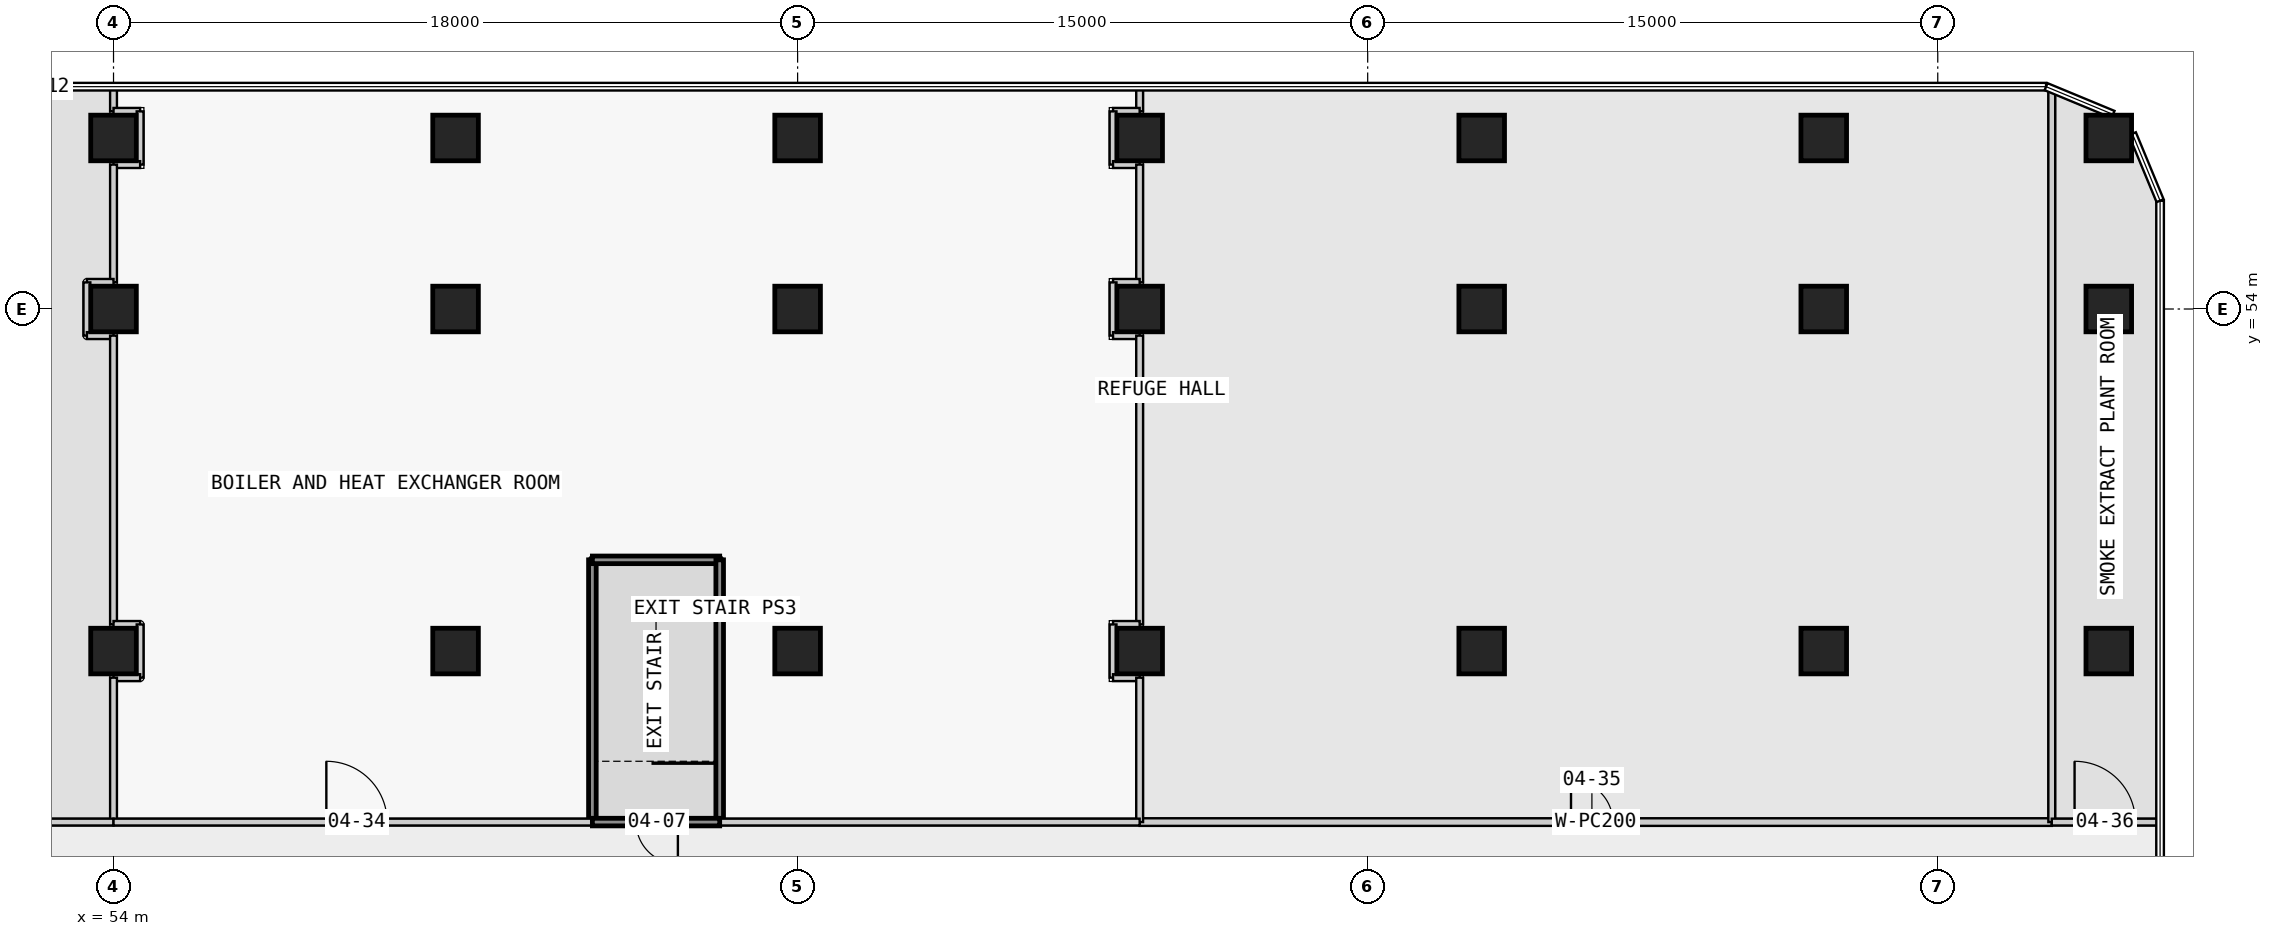
"""IFC4 building model, lengths in metres.
Left out: names, types, materials, properties, quantities, classifications, styles, units other than length and angle.
Written with IfcOpenShell. Run it as: python <this file> out.ifc"""

import sys

from ifc_helpers import new_model, si_unit, direction, frame, frame_2d, origin, origin_2d, place, context, subcontext, project, spatial, rectangle, extrude, element, fill, save


model = new_model("IFC4")
c1 = context("Model", 3, precision=1e-05, world=origin(), true_north=direction((0.0, 1.0)))
c2 = subcontext(c1, "Body", "Model", "MODEL_VIEW")
j1 = project(units=[si_unit("LENGTHUNIT", "METRE"), si_unit("PLANEANGLEUNIT", "RADIAN")], contexts=[c1])
p1 = place(None, origin())
s1 = spatial("IfcSite", under=j1, at=p1, CompositionType="ELEMENT")
p2 = place(p1, origin())
s2 = spatial("IfcBuilding", under=s1, at=p2, CompositionType="ELEMENT")
p3 = place(p2, frame((0.0, 0.0, 21.8)))
s3 = spatial("IfcBuildingStorey", under=s2, at=p3, CompositionType="ELEMENT", Elevation=21.8)
for number, where, z_axis, x_axis in (
    (1, (54.0, 45.0, 0.0), (0.0, 0.0, 1.0), (1.0, 0.0, 0.0)),
    (2, (54.0, 54.0, 0.0), (0.0, 0.0, 1.0), (1.0, 0.0, 0.0)),
    (3, (54.0, 58.5, 0.0), (0.0, 0.0, 1.0), (1.0, 0.0, 0.0)),
    (4, (63.0, 45.0, 0.0), (0.0, 0.0, 1.0), (1.0, 0.0, 0.0)),
    (5, (63.0, 54.0, 0.0), (0.0, 0.0, 1.0), (1.0, 0.0, 0.0)),
    (6, (63.0, 58.5, 0.0), (0.0, 0.0, 1.0), (1.0, 0.0, 0.0)),
    (7, (72.0, 45.0, 0.0), (0.0, 0.0, 1.0), (1.0, 0.0, 0.0)),
    (8, (72.0, 54.0, 0.0), (0.0, 0.0, 1.0), (1.0, 0.0, 0.0)),
    (9, (72.0, 58.5, 0.0), (0.0, 0.0, 1.0), (1.0, 0.0, 0.0)),
    (10, (81.0, 45.0, 0.0), (0.0, 0.0, 1.0), (1.0, 0.0, 0.0)),
    (11, (81.0, 54.0, 0.0), (0.0, 0.0, 1.0), (1.0, 0.0, 0.0)),
    (12, (81.0, 58.5, 0.0), (0.0, 0.0, 1.0), (1.0, 0.0, 0.0)),
    (13, (90.0, 45.0, 0.0), (0.0, 0.0, 1.0), (1.0, 0.0, 0.0)),
    (14, (90.0, 54.0, 0.0), (0.0, 0.0, 1.0), (1.0, 0.0, 0.0)),
    (15, (90.0, 58.5, 0.0), (0.0, 0.0, 1.0), (1.0, 0.0, 0.0)),
    (16, (99.0, 45.0, 0.0), (0.0, 0.0, 1.0), (1.0, 0.0, 0.0)),
    (17, (99.0, 54.0, 0.0), (0.0, 0.0, 1.0), (1.0, 0.0, 0.0)),
    (18, (99.0, 58.5, 0.0), (0.0, 0.0, 1.0), (1.0, 0.0, 0.0)),
    (19, (106.5, 45.0, 0.0), (0.0, 0.0, 1.0), (1.0, 0.0, 0.0)),
    (20, (106.5, 54.0, 0.0), (0.0, 0.0, 1.0), (1.0, 0.0, 0.0)),
    (21, (106.5, 58.5, 0.0), (0.0, 0.0, 1.0), (1.0, 0.0, 0.0)),
):
    element("IfcColumn", number, at=place(p3, frame(where, z_axis=z_axis, x_axis=x_axis)), inside=s3, PredefinedType="COLUMN", context=c2, shape_type="SweptSolid", body=[
        extrude(rectangle(XDim=1.2, YDim=1.2, at=origin_2d()), origin(), (0.0, 0.0, 1.0), 5.0),
    ])
p4 = place(p3, frame((81.0, 40.5, 0.0), z_axis=(0.0, 0.0, 1.0), x_axis=(1.0, 0.0, 0.0)))
e22 = element("IfcWall", 22, at=p4, inside=s3, PredefinedType="PARTITIONING", context=c2, shape_type="SweptSolid", body=[
    extrude(rectangle(XDim=24.0, YDim=0.2, at=frame_2d((12.0, 0.0))), origin(), (0.0, 0.0, 1.0), 4.5),
])
p5 = place(p4, frame((11.35, 0.0, 0.0)))
e23 = element("IfcOpeningElement", 23, at=p5, cuts=e22, PredefinedType="OPENING", context=c2, shape_type="SweptSolid", body=[
    extrude(rectangle(XDim=1.1, YDim=2.1, at=frame_2d((0.55, 1.05))), frame((0.0, 0.11, 0.0), z_axis=(0.0, -1.0, 0.0), x_axis=(1.0, 0.0, 0.0)), (0.0, 0.0, 1.0), 0.22),
])
p6 = place(p3, frame((81.0, 59.85, 0.0), z_axis=(0.0, 0.0, 1.0), x_axis=(0.0, -1.0, 0.0)))
e24 = element("IfcWall", 24, at=p6, inside=s3, PredefinedType="PARTITIONING", context=c2, shape_type="SweptSolid", body=[
    extrude(rectangle(XDim=0.65, YDim=0.18, at=frame_2d((0.325, 0.0))), origin(), (0.0, 0.0, 1.0), 4.5),
])
p7 = place(p3, frame((81.0, 59.2, 0.0), z_axis=(0.0, 0.0, 1.0), x_axis=(-1.0, 0.0, 0.0)))
e25 = element("IfcWall", 25, at=p7, inside=s3, PredefinedType="PARTITIONING", context=c2, shape_type="SweptSolid", body=[
    extrude(rectangle(XDim=0.7, YDim=0.18, at=frame_2d((0.35, 0.0))), origin(), (0.0, 0.0, 1.0), 4.5),
])
p8 = place(p3, frame((80.3, 59.2, 0.0), z_axis=(0.0, 0.0, 1.0), x_axis=(0.0, -1.0, 0.0)))
e26 = element("IfcWall", 26, at=p8, inside=s3, PredefinedType="PARTITIONING", context=c2, shape_type="SweptSolid", body=[
    extrude(rectangle(XDim=1.4, YDim=0.18, at=frame_2d((0.7, 0.0))), origin(), (0.0, 0.0, 1.0), 4.5),
])
p9 = place(p3, frame((80.3, 57.8, 0.0), z_axis=(0.0, 0.0, 1.0), x_axis=(1.0, 0.0, 0.0)))
e27 = element("IfcWall", 27, at=p9, inside=s3, PredefinedType="PARTITIONING", context=c2, shape_type="SweptSolid", body=[
    extrude(rectangle(XDim=0.7, YDim=0.18, at=frame_2d((0.35, 0.0))), origin(), (0.0, 0.0, 1.0), 4.5),
])
p10 = place(p3, frame((81.0, 57.8, 0.0), z_axis=(0.0, 0.0, 1.0), x_axis=(0.0, -1.0, 0.0)))
e28 = element("IfcWall", 28, at=p10, inside=s3, PredefinedType="PARTITIONING", context=c2, shape_type="SweptSolid", body=[
    extrude(rectangle(XDim=3.1, YDim=0.18, at=frame_2d((1.55, 0.0))), origin(), (0.0, 0.0, 1.0), 4.5),
])
p11 = place(p3, frame((81.0, 54.7, 0.0), z_axis=(0.0, 0.0, 1.0), x_axis=(-1.0, 0.0, 0.0)))
e29 = element("IfcWall", 29, at=p11, inside=s3, PredefinedType="PARTITIONING", context=c2, shape_type="SweptSolid", body=[
    extrude(rectangle(XDim=0.7, YDim=0.18, at=frame_2d((0.35, 0.0))), origin(), (0.0, 0.0, 1.0), 4.5),
])
p12 = place(p3, frame((80.3, 54.7, 0.0), z_axis=(0.0, 0.0, 1.0), x_axis=(0.0, -1.0, 0.0)))
e30 = element("IfcWall", 30, at=p12, inside=s3, PredefinedType="PARTITIONING", context=c2, shape_type="SweptSolid", body=[
    extrude(rectangle(XDim=1.4, YDim=0.18, at=frame_2d((0.7, 0.0))), origin(), (0.0, 0.0, 1.0), 4.5),
])
p13 = place(p3, frame((80.3, 53.3, 0.0), z_axis=(0.0, 0.0, 1.0), x_axis=(1.0, 0.0, 0.0)))
e31 = element("IfcWall", 31, at=p13, inside=s3, PredefinedType="PARTITIONING", context=c2, shape_type="SweptSolid", body=[
    extrude(rectangle(XDim=0.7, YDim=0.18, at=frame_2d((0.35, 0.0))), origin(), (0.0, 0.0, 1.0), 4.5),
])
p14 = place(p3, frame((81.0, 53.3, 0.0), z_axis=(0.0, 0.0, 1.0), x_axis=(0.0, -1.0, 0.0)))
e32 = element("IfcWall", 32, at=p14, inside=s3, PredefinedType="PARTITIONING", context=c2, shape_type="SweptSolid", body=[
    extrude(rectangle(XDim=7.6, YDim=0.18, at=frame_2d((3.8, 0.0))), origin(), (0.0, 0.0, 1.0), 4.5),
])
p15 = place(p3, frame((81.0, 45.7, 0.0), z_axis=(0.0, 0.0, 1.0), x_axis=(-1.0, 0.0, 0.0)))
e33 = element("IfcWall", 33, at=p15, inside=s3, PredefinedType="PARTITIONING", context=c2, shape_type="SweptSolid", body=[
    extrude(rectangle(XDim=0.7, YDim=0.18, at=frame_2d((0.35, 0.0))), origin(), (0.0, 0.0, 1.0), 4.5),
])
p16 = place(p3, frame((80.3, 45.7, 0.0), z_axis=(0.0, 0.0, 1.0), x_axis=(0.0, -1.0, 0.0)))
e34 = element("IfcWall", 34, at=p16, inside=s3, PredefinedType="PARTITIONING", context=c2, shape_type="SweptSolid", body=[
    extrude(rectangle(XDim=1.4, YDim=0.18, at=frame_2d((0.7, 0.0))), origin(), (0.0, 0.0, 1.0), 4.5),
])
p17 = place(p3, frame((80.3, 44.3, 0.0), z_axis=(0.0, 0.0, 1.0), x_axis=(1.0, 0.0, 0.0)))
e35 = element("IfcWall", 35, at=p17, inside=s3, PredefinedType="PARTITIONING", context=c2, shape_type="SweptSolid", body=[
    extrude(rectangle(XDim=0.7, YDim=0.18, at=frame_2d((0.35, 0.0))), origin(), (0.0, 0.0, 1.0), 4.5),
])
p18 = place(p3, frame((81.0, 44.3, 0.0), z_axis=(0.0, 0.0, 1.0), x_axis=(0.0, -1.0, 0.0)))
e36 = element("IfcWall", 36, at=p18, inside=s3, PredefinedType="PARTITIONING", context=c2, shape_type="SweptSolid", body=[
    extrude(rectangle(XDim=3.8, YDim=0.18, at=frame_2d((1.9, 0.0))), origin(), (0.0, 0.0, 1.0), 4.5),
])
p19 = place(p3, frame((54.0, 59.85, 0.0), z_axis=(0.0, 0.0, 1.0), x_axis=(0.0, -1.0, 0.0)))
e37 = element("IfcWall", 37, at=p19, inside=s3, PredefinedType="PARTITIONING", context=c2, shape_type="SweptSolid", body=[
    extrude(rectangle(XDim=0.65, YDim=0.18, at=frame_2d((0.325, 0.0))), origin(), (0.0, 0.0, 1.0), 4.5),
])
p20 = place(p3, frame((54.0, 59.2, 0.0), z_axis=(0.0, 0.0, 1.0), x_axis=(1.0, 0.0, 0.0)))
e38 = element("IfcWall", 38, at=p20, inside=s3, PredefinedType="PARTITIONING", context=c2, shape_type="SweptSolid", body=[
    extrude(rectangle(XDim=0.7, YDim=0.18, at=frame_2d((0.35, 0.0))), origin(), (0.0, 0.0, 1.0), 4.5),
])
p21 = place(p3, frame((54.7, 59.2, 0.0), z_axis=(0.0, 0.0, 1.0), x_axis=(0.0, -1.0, 0.0)))
e39 = element("IfcWall", 39, at=p21, inside=s3, PredefinedType="PARTITIONING", context=c2, shape_type="SweptSolid", body=[
    extrude(rectangle(XDim=1.4, YDim=0.18, at=frame_2d((0.7, 0.0))), origin(), (0.0, 0.0, 1.0), 4.5),
])
p22 = place(p3, frame((54.7, 57.8, 0.0), z_axis=(0.0, 0.0, 1.0), x_axis=(-1.0, 0.0, 0.0)))
e40 = element("IfcWall", 40, at=p22, inside=s3, PredefinedType="PARTITIONING", context=c2, shape_type="SweptSolid", body=[
    extrude(rectangle(XDim=0.7, YDim=0.18, at=frame_2d((0.35, 0.0))), origin(), (0.0, 0.0, 1.0), 4.5),
])
p23 = place(p3, frame((54.0, 57.8, 0.0), z_axis=(0.0, 0.0, 1.0), x_axis=(0.0, -1.0, 0.0)))
e41 = element("IfcWall", 41, at=p23, inside=s3, PredefinedType="PARTITIONING", context=c2, shape_type="SweptSolid", body=[
    extrude(rectangle(XDim=3.1, YDim=0.18, at=frame_2d((1.55, 0.0))), origin(), (0.0, 0.0, 1.0), 4.5),
])
p24 = place(p3, frame((54.0, 54.7, 0.0), z_axis=(0.0, 0.0, 1.0), x_axis=(-1.0, 0.0, 0.0)))
e42 = element("IfcWall", 42, at=p24, inside=s3, PredefinedType="PARTITIONING", context=c2, shape_type="SweptSolid", body=[
    extrude(rectangle(XDim=0.7, YDim=0.18, at=frame_2d((0.35, 0.0))), origin(), (0.0, 0.0, 1.0), 4.5),
])
p25 = place(p3, frame((53.3, 54.7, 0.0), z_axis=(0.0, 0.0, 1.0), x_axis=(0.0, -1.0, 0.0)))
e43 = element("IfcWall", 43, at=p25, inside=s3, PredefinedType="PARTITIONING", context=c2, shape_type="SweptSolid", body=[
    extrude(rectangle(XDim=1.4, YDim=0.18, at=frame_2d((0.7, 0.0))), origin(), (0.0, 0.0, 1.0), 4.5),
])
p26 = place(p3, frame((53.3, 53.3, 0.0), z_axis=(0.0, 0.0, 1.0), x_axis=(1.0, 0.0, 0.0)))
e44 = element("IfcWall", 44, at=p26, inside=s3, PredefinedType="PARTITIONING", context=c2, shape_type="SweptSolid", body=[
    extrude(rectangle(XDim=0.7, YDim=0.18, at=frame_2d((0.35, 0.0))), origin(), (0.0, 0.0, 1.0), 4.5),
])
p27 = place(p3, frame((54.0, 53.3, 0.0), z_axis=(0.0, 0.0, 1.0), x_axis=(0.0, -1.0, 0.0)))
e45 = element("IfcWall", 45, at=p27, inside=s3, PredefinedType="PARTITIONING", context=c2, shape_type="SweptSolid", body=[
    extrude(rectangle(XDim=7.6, YDim=0.18, at=frame_2d((3.8, 0.0))), origin(), (0.0, 0.0, 1.0), 4.5),
])
p28 = place(p3, frame((54.0, 45.7, 0.0), z_axis=(0.0, 0.0, 1.0), x_axis=(1.0, 0.0, 0.0)))
e46 = element("IfcWall", 46, at=p28, inside=s3, PredefinedType="PARTITIONING", context=c2, shape_type="SweptSolid", body=[
    extrude(rectangle(XDim=0.7, YDim=0.18, at=frame_2d((0.35, 0.0))), origin(), (0.0, 0.0, 1.0), 4.5),
])
p29 = place(p3, frame((54.7, 45.7, 0.0), z_axis=(0.0, 0.0, 1.0), x_axis=(0.0, -1.0, 0.0)))
e47 = element("IfcWall", 47, at=p29, inside=s3, PredefinedType="PARTITIONING", context=c2, shape_type="SweptSolid", body=[
    extrude(rectangle(XDim=1.4, YDim=0.18, at=frame_2d((0.7, 0.0))), origin(), (0.0, 0.0, 1.0), 4.5),
])
p30 = place(p3, frame((54.7, 44.3, 0.0), z_axis=(0.0, 0.0, 1.0), x_axis=(-1.0, 0.0, 0.0)))
e48 = element("IfcWall", 48, at=p30, inside=s3, PredefinedType="PARTITIONING", context=c2, shape_type="SweptSolid", body=[
    extrude(rectangle(XDim=0.7, YDim=0.18, at=frame_2d((0.35, 0.0))), origin(), (0.0, 0.0, 1.0), 4.5),
])
p31 = place(p3, frame((54.0, 44.3, 0.0), z_axis=(0.0, 0.0, 1.0), x_axis=(0.0, -1.0, 0.0)))
e49 = element("IfcWall", 49, at=p31, inside=s3, PredefinedType="PARTITIONING", context=c2, shape_type="SweptSolid", body=[
    extrude(rectangle(XDim=3.8, YDim=0.18, at=frame_2d((1.9, 0.0))), origin(), (0.0, 0.0, 1.0), 4.5),
])
p32 = place(p3, frame((33.95, 40.5, 0.0), z_axis=(0.0, 0.0, 1.0), x_axis=(1.0, 0.0, 0.0)))
e50 = element("IfcWall", 50, at=p32, inside=s3, PredefinedType="PARTITIONING", context=c2, shape_type="SweptSolid", body=[
    extrude(rectangle(XDim=20.05, YDim=0.18, at=frame_2d((10.025, 0.0))), origin(), (0.0, 0.0, 1.0), 4.5),
])
p33 = place(p3, frame((105.0, 59.788, 0.0), z_axis=(0.0, 0.0, 1.0), x_axis=(0.0, -1.0, 0.0)))
e51 = element("IfcWall", 51, at=p33, inside=s3, PredefinedType="PARTITIONING", context=c2, shape_type="SweptSolid", body=[
    extrude(rectangle(XDim=19.288, YDim=0.18, at=frame_2d((9.644, 0.0))), origin(), (0.0, 0.0, 1.0), 4.5),
])
p34 = place(p3, frame((66.6, 40.5, 0.0), z_axis=(0.0, 0.0, 1.0), x_axis=(0.0, 1.0, 0.0)))
e52 = element("IfcWall", 52, at=p34, inside=s3, PredefinedType="PARTITIONING", context=c2, shape_type="SweptSolid", body=[
    extrude(rectangle(XDim=6.9, YDim=0.2, at=frame_2d((3.45, 0.0))), origin(), (0.0, 0.0, 1.0), 4.5),
])
p35 = place(p3, frame((66.6, 47.4, 0.0), z_axis=(0.0, 0.0, 1.0), x_axis=(1.0, 0.0, 0.0)))
e53 = element("IfcWall", 53, at=p35, inside=s3, PredefinedType="PARTITIONING", context=c2, shape_type="SweptSolid", body=[
    extrude(rectangle(XDim=3.35, YDim=0.2, at=frame_2d((1.675, 0.0))), origin(), (0.0, 0.0, 1.0), 4.5),
])
p36 = place(p3, frame((69.95, 47.4, 0.0), z_axis=(0.0, 0.0, 1.0), x_axis=(0.0, -1.0, 0.0)))
e54 = element("IfcWall", 54, at=p36, inside=s3, PredefinedType="PARTITIONING", context=c2, shape_type="SweptSolid", body=[
    extrude(rectangle(XDim=6.9, YDim=0.2, at=frame_2d((3.45, 0.0))), origin(), (0.0, 0.0, 1.0), 4.5),
])
p37 = place(p3, frame((54.0, 40.5, 0.0), z_axis=(0.0, 0.0, 1.0), x_axis=(1.0, 0.0, 0.0)))
e55 = element("IfcWall", 55, at=p37, inside=s3, PredefinedType="PARTITIONING", context=c2, shape_type="SweptSolid", body=[
    extrude(rectangle(XDim=12.6, YDim=0.18, at=frame_2d((6.3, 0.0))), origin(), (0.0, 0.0, 1.0), 4.5),
])
p38 = place(p37, frame((5.6, 0.0, 0.0)))
e56 = element("IfcOpeningElement", 56, at=p38, cuts=e55, PredefinedType="OPENING", context=c2, shape_type="SweptSolid", body=[
    extrude(rectangle(XDim=1.6, YDim=2.4, at=frame_2d((0.8, 1.2))), frame((0.0, 0.1, 0.0), z_axis=(0.0, -1.0, 0.0), x_axis=(1.0, 0.0, 0.0)), (0.0, 0.0, 1.0), 0.2),
])
p39 = place(p3, frame((69.95, 40.5, 0.0), z_axis=(0.0, 0.0, 1.0), x_axis=(1.0, 0.0, 0.0)))
e57 = element("IfcWall", 57, at=p39, inside=s3, PredefinedType="PARTITIONING", context=c2, shape_type="SweptSolid", body=[
    extrude(rectangle(XDim=11.05, YDim=0.18, at=frame_2d((5.525, 0.0))), origin(), (0.0, 0.0, 1.0), 4.5),
])
p40 = place(p3, frame((69.95, 40.5, 0.0), z_axis=(0.0, 0.0, 1.0), x_axis=(-1.0, 0.0, 0.0)))
e58 = element("IfcWall", 58, at=p40, inside=s3, PredefinedType="PARTITIONING", context=c2, shape_type="SweptSolid", body=[
    extrude(rectangle(XDim=3.35, YDim=0.2, at=frame_2d((1.675, 0.0))), origin(), (0.0, 0.0, 1.0), 4.5),
])
p41 = place(p40, frame((1.1, 0.0, 0.0)))
e59 = element("IfcOpeningElement", 59, at=p41, cuts=e58, PredefinedType="OPENING", context=c2, shape_type="SweptSolid", body=[
    extrude(rectangle(XDim=1.1, YDim=2.1, at=frame_2d((0.55, 1.05))), frame((0.0, 0.11, 0.0), z_axis=(0.0, -1.0, 0.0), x_axis=(1.0, 0.0, 0.0)), (0.0, 0.0, 1.0), 0.22),
])
p42 = place(p3, frame((105.0, 40.5, 0.0), z_axis=(0.0, 0.0, 1.0), x_axis=(1.0, 0.0, 0.0)))
e60 = element("IfcWall", 60, at=p42, inside=s3, PredefinedType="PARTITIONING", context=c2, shape_type="SweptSolid", body=[
    extrude(rectangle(XDim=2.85, YDim=0.18, at=frame_2d((1.425, 0.0))), origin(), (0.0, 0.0, 1.0), 4.5),
])
p43 = place(p42, frame((0.6, 0.0, 0.0)))
e61 = element("IfcOpeningElement", 61, at=p43, cuts=e60, PredefinedType="OPENING", context=c2, shape_type="SweptSolid", body=[
    extrude(rectangle(XDim=1.6, YDim=2.4, at=frame_2d((0.8, 1.2))), frame((0.0, 0.1, 0.0), z_axis=(0.0, -1.0, 0.0), x_axis=(1.0, 0.0, 0.0)), (0.0, 0.0, 1.0), 0.2),
])
p44 = place(p41, origin())
e62 = element("IfcDoor", 62, at=p44, inside=s3, OperationType="SINGLE_SWING_LEFT", PredefinedType="DOOR", context=c2, shape_type="SweptSolid", body=[
    extrude(rectangle(XDim=1.1, YDim=2.1, at=frame_2d((0.55, 1.05))), frame((0.0, 0.025, 0.0), z_axis=(0.0, -1.0, 0.0), x_axis=(1.0, 0.0, 0.0)), (0.0, 0.0, 1.0), 0.05),
])
fill(e59, e62)
p45 = place(p38, origin())
e63 = element("IfcDoor", 63, at=p45, inside=s3, OperationType="SINGLE_SWING_LEFT", PredefinedType="DOOR", context=c2, shape_type="SweptSolid", body=[
    extrude(rectangle(XDim=1.6, YDim=2.4, at=frame_2d((0.8, 1.2))), frame((0.0, 0.025, 0.0), z_axis=(0.0, -1.0, 0.0), x_axis=(1.0, 0.0, 0.0)), (0.0, 0.0, 1.0), 0.05),
])
fill(e56, e63)
p46 = place(p5, origin())
e64 = element("IfcDoor", 64, at=p46, inside=s3, OperationType="SINGLE_SWING_LEFT", PredefinedType="DOOR", context=c2, shape_type="SweptSolid", body=[
    extrude(rectangle(XDim=1.1, YDim=2.1, at=frame_2d((0.55, 1.05))), frame((0.0, 0.025, 0.0), z_axis=(0.0, -1.0, 0.0), x_axis=(1.0, 0.0, 0.0)), (0.0, 0.0, 1.0), 0.05),
])
fill(e23, e64)
p47 = place(p43, origin())
e65 = element("IfcDoor", 65, at=p47, inside=s3, OperationType="SINGLE_SWING_LEFT", PredefinedType="DOOR", context=c2, shape_type="SweptSolid", body=[
    extrude(rectangle(XDim=1.6, YDim=2.4, at=frame_2d((0.8, 1.2))), frame((0.0, 0.025, 0.0), z_axis=(0.0, -1.0, 0.0), x_axis=(1.0, 0.0, 0.0)), (0.0, 0.0, 1.0), 0.05),
])
fill(e61, e65)
save(model, sys.argv[1])
